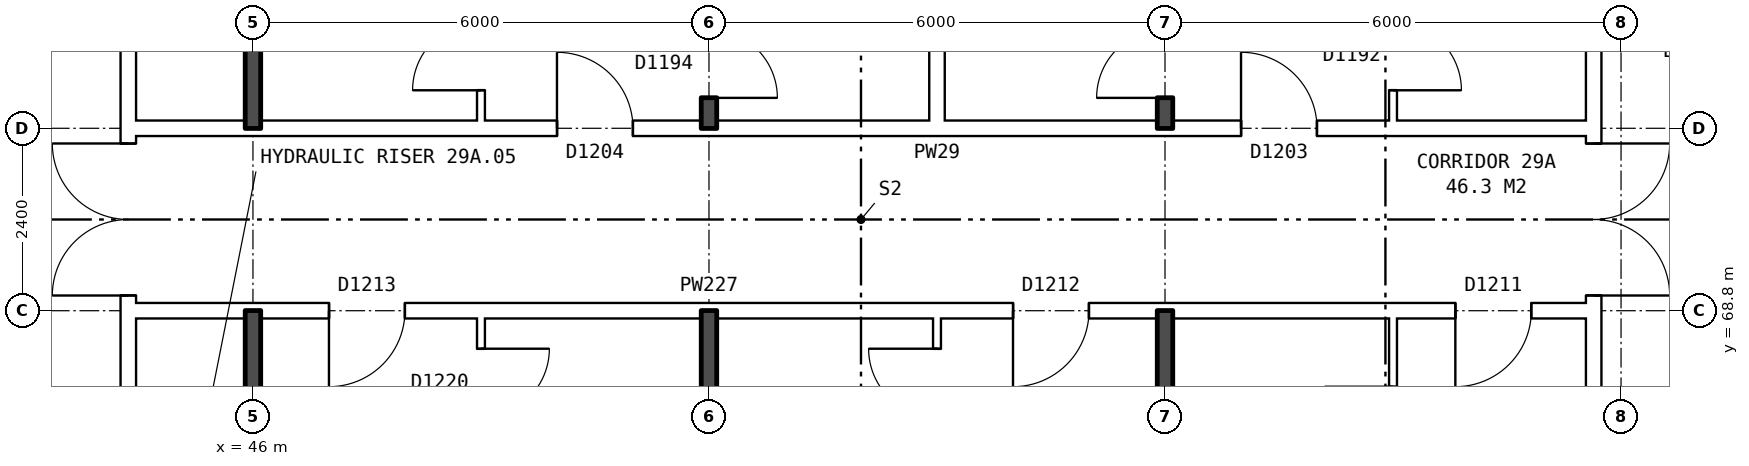
"""IFC4 building model, lengths in metres.
Left out: names, types, materials, properties, quantities, classifications, styles, units other than length and angle.
Written with IfcOpenShell. Run it as: python <this file> out.ifc"""

import sys

from ifc_helpers import new_model, si_unit, direction, frame, frame_2d, origin, place, context, subcontext, project, spatial, rectangle, extrude, element, fill, save


model = new_model("IFC4")
c1 = context("Model", 3, precision=1e-05, world=origin(), true_north=direction((0.0, 1.0)))
c2 = subcontext(c1, "Body", "Model", "MODEL_VIEW")
j1 = project(units=[si_unit("LENGTHUNIT", "METRE"), si_unit("PLANEANGLEUNIT", "RADIAN")], contexts=[c1])
p1 = place(None, origin())
s1 = spatial("IfcSite", under=j1, at=p1, CompositionType="ELEMENT")
p2 = place(p1, origin())
s2 = spatial("IfcBuilding", under=s1, at=p2, CompositionType="ELEMENT")
p3 = place(p2, frame((0.0, 0.0, 105.7)))
s3 = spatial("IfcBuildingStorey", under=s2, at=p3, CompositionType="ELEMENT", Elevation=105.7)
p4 = place(p3, frame((63.64, 63.9, 0.0), z_axis=(0.0, 0.0, 1.0), x_axis=(0.0, 1.0, 0.0)))
e1 = element("IfcWall", 1, at=p4, inside=s3, PredefinedType="PARTITIONING", context=c2, shape_type="SweptSolid", body=[
    extrude(rectangle(XDim=12.2, YDim=0.2, at=frame_2d((6.1, 0.0))), origin(), (0.0, 0.0, 1.0), 2.85),
])
p5 = place(p4, frame((5.1, 0.0, 0.0)))
e2 = element("IfcOpeningElement", 2, at=p5, cuts=e1, PredefinedType="OPENING", context=c2, shape_type="SweptSolid", body=[
    extrude(rectangle(XDim=2.0, YDim=2.1, at=frame_2d((1.0, 1.05))), frame((0.0, 0.11, 0.0), z_axis=(0.0, -1.0, 0.0), x_axis=(1.0, 0.0, 0.0)), (0.0, 0.0, 1.0), 0.22),
])
p6 = place(p3, frame((44.36, 63.9, 0.0), z_axis=(0.0, 0.0, 1.0), x_axis=(0.0, 1.0, 0.0)))
e3 = element("IfcWall", 3, at=p6, inside=s3, PredefinedType="PARTITIONING", context=c2, shape_type="SweptSolid", body=[
    extrude(rectangle(XDim=12.2, YDim=0.2, at=frame_2d((6.1, 0.0))), origin(), (0.0, 0.0, 1.0), 2.85),
])
p7 = place(p6, frame((5.1, 0.0, 0.0)))
e4 = element("IfcOpeningElement", 4, at=p7, cuts=e3, PredefinedType="OPENING", context=c2, shape_type="SweptSolid", body=[
    extrude(rectangle(XDim=2.0, YDim=2.1, at=frame_2d((1.0, 1.05))), frame((0.0, 0.11, 0.0), z_axis=(0.0, -1.0, 0.0), x_axis=(1.0, 0.0, 0.0)), (0.0, 0.0, 1.0), 0.22),
])
p8 = place(p3, frame((44.36, 68.8, 0.0), z_axis=(0.0, 0.0, 1.0), x_axis=(1.0, 0.0, 0.0)))
e5 = element("IfcWall", 5, at=p8, inside=s3, PredefinedType="PARTITIONING", context=c2, shape_type="SweptSolid", body=[
    extrude(rectangle(XDim=19.28, YDim=0.2, at=frame_2d((9.64, 0.0))), origin(), (0.0, 0.0, 1.0), 2.85),
])
p9 = place(p8, frame((17.46, 0.0, 0.0)))
e6 = element("IfcOpeningElement", 6, at=p9, cuts=e5, PredefinedType="OPENING", context=c2, shape_type="SweptSolid", body=[
    extrude(rectangle(XDim=1.0, YDim=2.1, at=frame_2d((0.5, 1.05))), frame((0.0, 0.11, 0.0), z_axis=(0.0, -1.0, 0.0), x_axis=(1.0, 0.0, 0.0)), (0.0, 0.0, 1.0), 0.22),
])
p10 = place(p8, frame((11.64, 0.0, 0.0)))
e7 = element("IfcOpeningElement", 7, at=p10, cuts=e5, PredefinedType="OPENING", context=c2, shape_type="SweptSolid", body=[
    extrude(rectangle(XDim=1.0, YDim=2.1, at=frame_2d((0.5, 1.05))), frame((0.0, 0.11, 0.0), z_axis=(0.0, -1.0, 0.0), x_axis=(1.0, 0.0, 0.0)), (0.0, 0.0, 1.0), 0.22),
])
p11 = place(p8, frame((2.64, 0.0, 0.0)))
e8 = element("IfcOpeningElement", 8, at=p11, cuts=e5, PredefinedType="OPENING", context=c2, shape_type="SweptSolid", body=[
    extrude(rectangle(XDim=1.0, YDim=2.1, at=frame_2d((0.5, 1.05))), frame((0.0, 0.11, 0.0), z_axis=(0.0, -1.0, 0.0), x_axis=(1.0, 0.0, 0.0)), (0.0, 0.0, 1.0), 0.22),
])
p12 = place(p3, frame((44.36, 71.2, 0.0), z_axis=(0.0, 0.0, 1.0), x_axis=(1.0, 0.0, 0.0)))
e9 = element("IfcWall", 9, at=p12, inside=s3, PredefinedType="PARTITIONING", context=c2, shape_type="SweptSolid", body=[
    extrude(rectangle(XDim=19.28, YDim=0.2, at=frame_2d((9.64, 0.0))), origin(), (0.0, 0.0, 1.0), 2.85),
])
p13 = place(p12, frame((14.64, 0.0, 0.0)))
e10 = element("IfcOpeningElement", 10, at=p13, cuts=e9, PredefinedType="OPENING", context=c2, shape_type="SweptSolid", body=[
    extrude(rectangle(XDim=1.0, YDim=2.1, at=frame_2d((0.5, 1.05))), frame((0.0, 0.11, 0.0), z_axis=(0.0, -1.0, 0.0), x_axis=(1.0, 0.0, 0.0)), (0.0, 0.0, 1.0), 0.22),
])
p14 = place(p12, frame((5.64, 0.0, 0.0)))
e11 = element("IfcOpeningElement", 11, at=p14, cuts=e9, PredefinedType="OPENING", context=c2, shape_type="SweptSolid", body=[
    extrude(rectangle(XDim=1.0, YDim=2.1, at=frame_2d((0.5, 1.05))), frame((0.0, 0.11, 0.0), z_axis=(0.0, -1.0, 0.0), x_axis=(1.0, 0.0, 0.0)), (0.0, 0.0, 1.0), 0.22),
])
for number, where, z_axis, x_axis in (
    (12, (46.0, 63.8, 0.0), (0.0, 0.0, 1.0), (0.0, 1.0, 0.0)),
    (13, (46.0, 71.2, 0.0), (0.0, 0.0, 1.0), (0.0, 1.0, 0.0)),
):
    element("IfcWall", number, at=place(p3, frame(where, z_axis=z_axis, x_axis=x_axis)), inside=s3, PredefinedType="SOLIDWALL", context=c2, shape_type="SweptSolid", body=[
        extrude(rectangle(XDim=5.0, YDim=0.2, at=frame_2d((2.5, 0.0))), origin(), (0.0, 0.0, 1.0), 2.85),
    ])
p15 = place(p3, frame((49.0, 54.36, 0.0), z_axis=(0.0, 0.0, 1.0), x_axis=(0.0, 1.0, 0.0)))
e14 = element("IfcWall", 14, at=p15, inside=s3, PredefinedType="PARTITIONING", context=c2, shape_type="SweptSolid", body=[
    extrude(rectangle(XDim=14.34, YDim=0.1, at=frame_2d((7.17, 0.0))), origin(), (0.0, 0.0, 1.0), 2.85),
])
p16 = place(p15, frame((6.7, 0.0, 0.0)))
e15 = element("IfcOpeningElement", 15, at=p16, cuts=e14, PredefinedType="OPENING", context=c2, shape_type="SweptSolid", body=[
    extrude(rectangle(XDim=0.9, YDim=2.1, at=frame_2d((0.45, 1.05))), frame((0.0, 0.06, 0.0), z_axis=(0.0, -1.0, 0.0), x_axis=(1.0, 0.0, 0.0)), (0.0, 0.0, 1.0), 0.12),
])
p17 = place(p15, frame((13.04, 0.0, 0.0)))
e16 = element("IfcOpeningElement", 16, at=p17, cuts=e14, PredefinedType="OPENING", context=c2, shape_type="SweptSolid", body=[
    extrude(rectangle(XDim=0.9, YDim=2.1, at=frame_2d((0.45, 1.05))), frame((0.0, 0.06, 0.0), z_axis=(0.0, -1.0, 0.0), x_axis=(1.0, 0.0, 0.0)), (0.0, 0.0, 1.0), 0.12),
])
p18 = place(p3, frame((49.0, 71.3, 0.0), z_axis=(0.0, 0.0, 1.0), x_axis=(0.0, 1.0, 0.0)))
e17 = element("IfcWall", 17, at=p18, inside=s3, PredefinedType="PARTITIONING", context=c2, shape_type="SweptSolid", body=[
    extrude(rectangle(XDim=14.34, YDim=0.1, at=frame_2d((7.17, 0.0))), origin(), (0.0, 0.0, 1.0), 2.85),
])
p19 = place(p18, frame((9.24, 0.0, 0.0)))
e18 = element("IfcOpeningElement", 18, at=p19, cuts=e17, PredefinedType="OPENING", context=c2, shape_type="SweptSolid", body=[
    extrude(rectangle(XDim=0.9, YDim=2.1, at=frame_2d((0.45, 1.05))), frame((0.0, 0.06, 0.0), z_axis=(0.0, -1.0, 0.0), x_axis=(1.0, 0.0, 0.0)), (0.0, 0.0, 1.0), 0.12),
])
p20 = place(p18, frame((0.4, 0.0, 0.0)))
e19 = element("IfcOpeningElement", 19, at=p20, cuts=e17, PredefinedType="OPENING", context=c2, shape_type="SweptSolid", body=[
    extrude(rectangle(XDim=0.9, YDim=2.1, at=frame_2d((0.45, 1.05))), frame((0.0, 0.06, 0.0), z_axis=(0.0, -1.0, 0.0), x_axis=(1.0, 0.0, 0.0)), (0.0, 0.0, 1.0), 0.12),
])
p21 = place(p3, frame((52.0, 54.36, 0.0), z_axis=(0.0, 0.0, 1.0), x_axis=(0.0, 1.0, 0.0)))
e20 = element("IfcWall", 20, at=p21, inside=s3, PredefinedType="SOLIDWALL", context=c2, shape_type="SweptSolid", body=[
    extrude(rectangle(XDim=14.44, YDim=0.2, at=frame_2d((7.22, 0.0))), origin(), (0.0, 0.0, 1.0), 2.85),
])
p22 = place(p3, frame((52.0, 71.2, 0.0), z_axis=(0.0, 0.0, 1.0), x_axis=(0.0, 1.0, 0.0)))
e21 = element("IfcWall", 21, at=p22, inside=s3, PredefinedType="SOLIDWALL", context=c2, shape_type="SweptSolid", body=[
    extrude(rectangle(XDim=14.44, YDim=0.2, at=frame_2d((7.22, 0.0))), origin(), (0.0, 0.0, 1.0), 2.85),
])
p23 = place(p22, frame((9.34, 0.0, 0.0)))
e22 = element("IfcOpeningElement", 22, at=p23, cuts=e21, PredefinedType="OPENING", context=c2, shape_type="SweptSolid", body=[
    extrude(rectangle(XDim=0.9, YDim=2.1, at=frame_2d((0.45, 1.05))), frame((0.0, 0.11, 0.0), z_axis=(0.0, -1.0, 0.0), x_axis=(1.0, 0.0, 0.0)), (0.0, 0.0, 1.0), 0.22),
])
p24 = place(p22, frame((0.4, 0.0, 0.0)))
e23 = element("IfcOpeningElement", 23, at=p24, cuts=e21, PredefinedType="OPENING", context=c2, shape_type="SweptSolid", body=[
    extrude(rectangle(XDim=0.9, YDim=2.1, at=frame_2d((0.45, 1.05))), frame((0.0, 0.11, 0.0), z_axis=(0.0, -1.0, 0.0), x_axis=(1.0, 0.0, 0.0)), (0.0, 0.0, 1.0), 0.22),
])
p25 = place(p3, frame((55.0, 54.36, 0.0), z_axis=(0.0, 0.0, 1.0), x_axis=(0.0, 1.0, 0.0)))
e24 = element("IfcWall", 24, at=p25, inside=s3, PredefinedType="PARTITIONING", context=c2, shape_type="SweptSolid", body=[
    extrude(rectangle(XDim=14.34, YDim=0.1, at=frame_2d((7.17, 0.0))), origin(), (0.0, 0.0, 1.0), 2.85),
])
p26 = place(p25, frame((7.7, 0.0, 0.0)))
e25 = element("IfcOpeningElement", 25, at=p26, cuts=e24, PredefinedType="OPENING", context=c2, shape_type="SweptSolid", body=[
    extrude(rectangle(XDim=0.9, YDim=2.1, at=frame_2d((0.45, 1.05))), frame((0.0, 0.06, 0.0), z_axis=(0.0, -1.0, 0.0), x_axis=(1.0, 0.0, 0.0)), (0.0, 0.0, 1.0), 0.12),
])
p27 = place(p25, frame((13.04, 0.0, 0.0)))
e26 = element("IfcOpeningElement", 26, at=p27, cuts=e24, PredefinedType="OPENING", context=c2, shape_type="SweptSolid", body=[
    extrude(rectangle(XDim=0.9, YDim=2.1, at=frame_2d((0.45, 1.05))), frame((0.0, 0.06, 0.0), z_axis=(0.0, -1.0, 0.0), x_axis=(1.0, 0.0, 0.0)), (0.0, 0.0, 1.0), 0.12),
])
p28 = place(p3, frame((55.0, 71.3, 0.0), z_axis=(0.0, 0.0, 1.0), x_axis=(0.0, 1.0, 0.0)))
e27 = element("IfcWall", 27, at=p28, inside=s3, PredefinedType="PARTITIONING", context=c2, shape_type="SweptSolid", body=[
    extrude(rectangle(XDim=14.34, YDim=0.2, at=frame_2d((7.17, 0.0))), origin(), (0.0, 0.0, 1.0), 2.85),
])
p29 = place(p3, frame((58.0, 54.36, 0.0), z_axis=(0.0, 0.0, 1.0), x_axis=(0.0, 1.0, 0.0)))
e28 = element("IfcWall", 28, at=p29, inside=s3, PredefinedType="SOLIDWALL", context=c2, shape_type="SweptSolid", body=[
    extrude(rectangle(XDim=14.44, YDim=0.2, at=frame_2d((7.22, 0.0))), origin(), (0.0, 0.0, 1.0), 2.85),
])
p30 = place(p3, frame((58.0, 71.2, 0.0), z_axis=(0.0, 0.0, 1.0), x_axis=(0.0, 1.0, 0.0)))
e29 = element("IfcWall", 29, at=p30, inside=s3, PredefinedType="SOLIDWALL", context=c2, shape_type="SweptSolid", body=[
    extrude(rectangle(XDim=14.44, YDim=0.2, at=frame_2d((7.22, 0.0))), origin(), (0.0, 0.0, 1.0), 2.85),
])
p31 = place(p30, frame((8.04, 0.0, 0.0)))
e30 = element("IfcOpeningElement", 30, at=p31, cuts=e29, PredefinedType="OPENING", context=c2, shape_type="SweptSolid", body=[
    extrude(rectangle(XDim=0.9, YDim=2.1, at=frame_2d((0.45, 1.05))), frame((0.0, 0.11, 0.0), z_axis=(0.0, -1.0, 0.0), x_axis=(1.0, 0.0, 0.0)), (0.0, 0.0, 1.0), 0.22),
])
p32 = place(p30, frame((0.4, 0.0, 0.0)))
e31 = element("IfcOpeningElement", 31, at=p32, cuts=e29, PredefinedType="OPENING", context=c2, shape_type="SweptSolid", body=[
    extrude(rectangle(XDim=0.9, YDim=2.1, at=frame_2d((0.45, 1.05))), frame((0.0, 0.11, 0.0), z_axis=(0.0, -1.0, 0.0), x_axis=(1.0, 0.0, 0.0)), (0.0, 0.0, 1.0), 0.22),
])
p33 = place(p3, frame((61.0, 54.36, 0.0), z_axis=(0.0, 0.0, 1.0), x_axis=(0.0, 1.0, 0.0)))
e32 = element("IfcWall", 32, at=p33, inside=s3, PredefinedType="PARTITIONING", context=c2, shape_type="SweptSolid", body=[
    extrude(rectangle(XDim=14.34, YDim=0.1, at=frame_2d((7.17, 0.0))), origin(), (0.0, 0.0, 1.0), 2.85),
])
p34 = place(p33, frame((5.5, 0.0, 0.0)))
e33 = element("IfcOpeningElement", 33, at=p34, cuts=e32, PredefinedType="OPENING", context=c2, shape_type="SweptSolid", body=[
    extrude(rectangle(XDim=0.9, YDim=2.1, at=frame_2d((0.45, 1.05))), frame((0.0, 0.06, 0.0), z_axis=(0.0, -1.0, 0.0), x_axis=(1.0, 0.0, 0.0)), (0.0, 0.0, 1.0), 0.12),
])
p35 = place(p33, frame((12.54, 0.0, 0.0)))
e34 = element("IfcOpeningElement", 34, at=p35, cuts=e32, PredefinedType="OPENING", context=c2, shape_type="SweptSolid", body=[
    extrude(rectangle(XDim=0.9, YDim=2.1, at=frame_2d((0.45, 1.05))), frame((0.0, 0.06, 0.0), z_axis=(0.0, -1.0, 0.0), x_axis=(1.0, 0.0, 0.0)), (0.0, 0.0, 1.0), 0.12),
])
p36 = place(p3, frame((61.0, 71.3, 0.0), z_axis=(0.0, 0.0, 1.0), x_axis=(0.0, 1.0, 0.0)))
e35 = element("IfcWall", 35, at=p36, inside=s3, PredefinedType="PARTITIONING", context=c2, shape_type="SweptSolid", body=[
    extrude(rectangle(XDim=14.34, YDim=0.1, at=frame_2d((7.17, 0.0))), origin(), (0.0, 0.0, 1.0), 2.85),
])
p37 = place(p36, frame((7.94, 0.0, 0.0)))
e36 = element("IfcOpeningElement", 36, at=p37, cuts=e35, PredefinedType="OPENING", context=c2, shape_type="SweptSolid", body=[
    extrude(rectangle(XDim=0.9, YDim=2.1, at=frame_2d((0.45, 1.05))), frame((0.0, 0.06, 0.0), z_axis=(0.0, -1.0, 0.0), x_axis=(1.0, 0.0, 0.0)), (0.0, 0.0, 1.0), 0.12),
])
p38 = place(p36, frame((0.4, 0.0, 0.0)))
e37 = element("IfcOpeningElement", 37, at=p38, cuts=e35, PredefinedType="OPENING", context=c2, shape_type="SweptSolid", body=[
    extrude(rectangle(XDim=0.9, YDim=2.1, at=frame_2d((0.45, 1.05))), frame((0.0, 0.06, 0.0), z_axis=(0.0, -1.0, 0.0), x_axis=(1.0, 0.0, 0.0)), (0.0, 0.0, 1.0), 0.12),
])
p39 = place(p5, frame((2.0, 0.0, 0.0), z_axis=(0.0, 0.0, 1.0), x_axis=(-1.0, 0.0, 0.0)))
e38 = element("IfcDoor", 38, at=p39, inside=s3, OperationType="DOUBLE_DOOR_SINGLE_SWING", PredefinedType="DOOR", context=c2, shape_type="SweptSolid", body=[
    extrude(rectangle(XDim=2.0, YDim=2.1, at=frame_2d((1.0, 1.05))), frame((0.0, 0.025, 0.0), z_axis=(0.0, -1.0, 0.0), x_axis=(1.0, 0.0, 0.0)), (0.0, 0.0, 1.0), 0.05),
])
fill(e2, e38)
p40 = place(p7, origin())
e39 = element("IfcDoor", 39, at=p40, inside=s3, OperationType="DOUBLE_DOOR_SINGLE_SWING", PredefinedType="DOOR", context=c2, shape_type="SweptSolid", body=[
    extrude(rectangle(XDim=2.0, YDim=2.1, at=frame_2d((1.0, 1.05))), frame((0.0, 0.025, 0.0), z_axis=(0.0, -1.0, 0.0), x_axis=(1.0, 0.0, 0.0)), (0.0, 0.0, 1.0), 0.05),
])
fill(e4, e39)
p41 = place(p9, frame((1.0, 0.0, 0.0), z_axis=(0.0, 0.0, 1.0), x_axis=(-1.0, 0.0, 0.0)))
e40 = element("IfcDoor", 40, at=p41, inside=s3, OperationType="SINGLE_SWING_RIGHT", PredefinedType="DOOR", context=c2, shape_type="SweptSolid", body=[
    extrude(rectangle(XDim=1.0, YDim=2.1, at=frame_2d((0.5, 1.05))), frame((0.0, 0.025, 0.0), z_axis=(0.0, -1.0, 0.0), x_axis=(1.0, 0.0, 0.0)), (0.0, 0.0, 1.0), 0.05),
])
fill(e6, e40)
p42 = place(p10, frame((1.0, 0.0, 0.0), z_axis=(0.0, 0.0, 1.0), x_axis=(-1.0, 0.0, 0.0)))
e41 = element("IfcDoor", 41, at=p42, inside=s3, OperationType="SINGLE_SWING_RIGHT", PredefinedType="DOOR", context=c2, shape_type="SweptSolid", body=[
    extrude(rectangle(XDim=1.0, YDim=2.1, at=frame_2d((0.5, 1.05))), frame((0.0, 0.025, 0.0), z_axis=(0.0, -1.0, 0.0), x_axis=(1.0, 0.0, 0.0)), (0.0, 0.0, 1.0), 0.05),
])
fill(e7, e41)
p43 = place(p27, origin())
e42 = element("IfcDoor", 42, at=p43, inside=s3, OperationType="SINGLE_SWING_RIGHT", PredefinedType="DOOR", context=c2, shape_type="SweptSolid", body=[
    extrude(rectangle(XDim=0.9, YDim=2.1, at=frame_2d((0.45, 1.05))), frame((0.0, 0.025, 0.0), z_axis=(0.0, -1.0, 0.0), x_axis=(1.0, 0.0, 0.0)), (0.0, 0.0, 1.0), 0.05),
])
fill(e26, e42)
p44 = place(p11, frame((1.0, 0.0, 0.0), z_axis=(0.0, 0.0, 1.0), x_axis=(-1.0, 0.0, 0.0)))
e43 = element("IfcDoor", 43, at=p44, inside=s3, OperationType="SINGLE_SWING_RIGHT", PredefinedType="DOOR", context=c2, shape_type="SweptSolid", body=[
    extrude(rectangle(XDim=1.0, YDim=2.1, at=frame_2d((0.5, 1.05))), frame((0.0, 0.025, 0.0), z_axis=(0.0, -1.0, 0.0), x_axis=(1.0, 0.0, 0.0)), (0.0, 0.0, 1.0), 0.05),
])
fill(e8, e43)
p45 = place(p17, frame((0.9, 0.0, 0.0), z_axis=(0.0, 0.0, 1.0), x_axis=(-1.0, 0.0, 0.0)))
e44 = element("IfcDoor", 44, at=p45, inside=s3, OperationType="SINGLE_SWING_LEFT", PredefinedType="DOOR", context=c2, shape_type="SweptSolid", body=[
    extrude(rectangle(XDim=0.9, YDim=2.1, at=frame_2d((0.45, 1.05))), frame((0.0, 0.025, 0.0), z_axis=(0.0, -1.0, 0.0), x_axis=(1.0, 0.0, 0.0)), (0.0, 0.0, 1.0), 0.05),
])
fill(e16, e44)
p46 = place(p13, origin())
e45 = element("IfcDoor", 45, at=p46, inside=s3, OperationType="SINGLE_SWING_LEFT", PredefinedType="DOOR", context=c2, shape_type="SweptSolid", body=[
    extrude(rectangle(XDim=1.0, YDim=2.1, at=frame_2d((0.5, 1.05))), frame((0.0, 0.025, 0.0), z_axis=(0.0, -1.0, 0.0), x_axis=(1.0, 0.0, 0.0)), (0.0, 0.0, 1.0), 0.05),
])
fill(e10, e45)
p47 = place(p38, frame((0.9, 0.0, 0.0), z_axis=(0.0, 0.0, 1.0), x_axis=(-1.0, 0.0, 0.0)))
e46 = element("IfcDoor", 46, at=p47, inside=s3, OperationType="SINGLE_SWING_RIGHT", PredefinedType="DOOR", context=c2, shape_type="SweptSolid", body=[
    extrude(rectangle(XDim=0.9, YDim=2.1, at=frame_2d((0.45, 1.05))), frame((0.0, 0.025, 0.0), z_axis=(0.0, -1.0, 0.0), x_axis=(1.0, 0.0, 0.0)), (0.0, 0.0, 1.0), 0.05),
])
fill(e37, e46)
p48 = place(p32, origin())
e47 = element("IfcDoor", 47, at=p48, inside=s3, OperationType="SINGLE_SWING_LEFT", PredefinedType="DOOR", context=c2, shape_type="SweptSolid", body=[
    extrude(rectangle(XDim=0.9, YDim=2.1, at=frame_2d((0.45, 1.05))), frame((0.0, 0.025, 0.0), z_axis=(0.0, -1.0, 0.0), x_axis=(1.0, 0.0, 0.0)), (0.0, 0.0, 1.0), 0.05),
])
fill(e31, e47)
p49 = place(p14, origin())
e48 = element("IfcDoor", 48, at=p49, inside=s3, OperationType="SINGLE_SWING_LEFT", PredefinedType="DOOR", context=c2, shape_type="SweptSolid", body=[
    extrude(rectangle(XDim=1.0, YDim=2.1, at=frame_2d((0.5, 1.05))), frame((0.0, 0.025, 0.0), z_axis=(0.0, -1.0, 0.0), x_axis=(1.0, 0.0, 0.0)), (0.0, 0.0, 1.0), 0.05),
])
fill(e11, e48)
p50 = place(p24, frame((0.9, 0.0, 0.0), z_axis=(0.0, 0.0, 1.0), x_axis=(-1.0, 0.0, 0.0)))
e49 = element("IfcDoor", 49, at=p50, inside=s3, OperationType="SINGLE_SWING_RIGHT", PredefinedType="DOOR", context=c2, shape_type="SweptSolid", body=[
    extrude(rectangle(XDim=0.9, YDim=2.1, at=frame_2d((0.45, 1.05))), frame((0.0, 0.025, 0.0), z_axis=(0.0, -1.0, 0.0), x_axis=(1.0, 0.0, 0.0)), (0.0, 0.0, 1.0), 0.05),
])
fill(e23, e49)
p51 = place(p20, origin())
e50 = element("IfcDoor", 50, at=p51, inside=s3, OperationType="SINGLE_SWING_LEFT", PredefinedType="DOOR", context=c2, shape_type="SweptSolid", body=[
    extrude(rectangle(XDim=0.9, YDim=2.1, at=frame_2d((0.45, 1.05))), frame((0.0, 0.025, 0.0), z_axis=(0.0, -1.0, 0.0), x_axis=(1.0, 0.0, 0.0)), (0.0, 0.0, 1.0), 0.05),
])
fill(e19, e50)
save(model, sys.argv[1])
